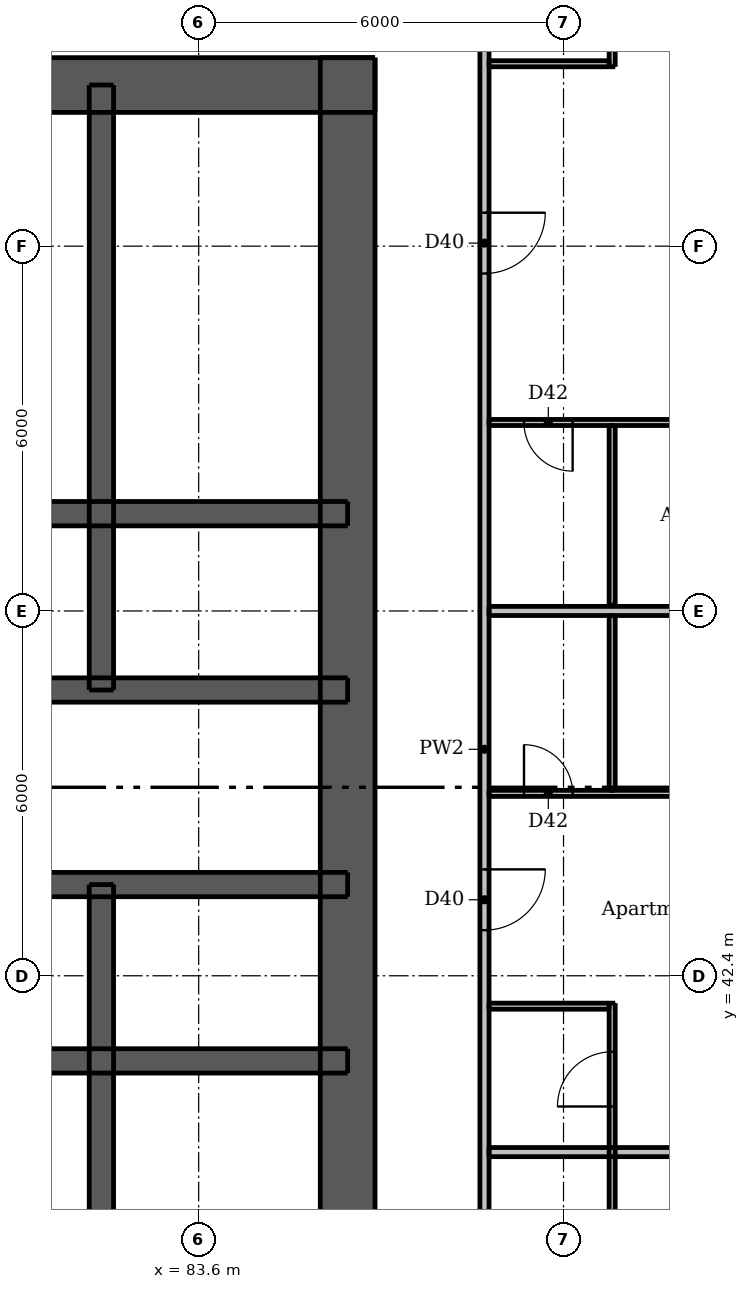
"""IFC4 building model, lengths in metres.
Left out: names, types, materials, properties, quantities, classifications, styles, units other than length and angle.
Written with IfcOpenShell. Run it as: python <this file> out.ifc"""

import sys

from ifc_helpers import new_model, si_unit, direction, frame, frame_2d, origin, place, context, subcontext, project, spatial, rectangle, extrude, element, fill, save


model = new_model("IFC4")
c1 = context("Model", 3, precision=1e-05, world=origin(), true_north=direction((0.0, 1.0)))
c2 = subcontext(c1, "Body", "Model", "MODEL_VIEW")
j1 = project(units=[si_unit("LENGTHUNIT", "METRE"), si_unit("PLANEANGLEUNIT", "RADIAN")], contexts=[c1])
p1 = place(None, origin())
s1 = spatial("IfcSite", under=j1, at=p1, CompositionType="ELEMENT")
p2 = place(p1, origin())
s2 = spatial("IfcBuilding", under=s1, at=p2, CompositionType="ELEMENT")
p3 = place(p2, frame((0.0, 0.0, 26.8)))
s3 = spatial("IfcBuildingStorey", under=s2, at=p3, CompositionType="ELEMENT", Elevation=26.8)
p4 = place(p3, frame((62.5, 57.05, 0.0), z_axis=(0.0, 0.0, 1.0), x_axis=(1.0, 0.0, 0.0)))
e1 = element("IfcWall", 1, at=p4, inside=s3, PredefinedType="SHEAR", context=c2, shape_type="SweptSolid", body=[
    extrude(rectangle(XDim=24.0, YDim=0.9, at=frame_2d((12.0, 0.0))), origin(), (0.0, 0.0, 1.0), 3.05),
])
p5 = place(p4, frame((20.85, 0.0, 0.0)))
e2 = element("IfcOpeningElement", 2, at=p5, cuts=e1, PredefinedType="OPENING", context=c2, shape_type="SweptSolid", body=[
    extrude(rectangle(XDim=1.1, YDim=2.1, at=frame_2d((0.55, 1.05))), frame((0.0, 0.46, 0.0), z_axis=(0.0, -1.0, 0.0), x_axis=(1.0, 0.0, 0.0)), (0.0, 0.0, 1.0), 0.92),
])
p6 = place(p4, frame((2.05, 0.0, 0.0)))
e3 = element("IfcOpeningElement", 3, at=p6, cuts=e1, PredefinedType="OPENING", context=c2, shape_type="SweptSolid", body=[
    extrude(rectangle(XDim=1.1, YDim=2.1, at=frame_2d((0.55, 1.05))), frame((0.0, 0.46, 0.0), z_axis=(0.0, -1.0, 0.0), x_axis=(1.0, 0.0, 0.0)), (0.0, 0.0, 1.0), 0.92),
])
p7 = place(p4, frame((6.44, 0.0, 0.0)))
e4 = element("IfcOpeningElement", 4, at=p7, cuts=e1, PredefinedType="OPENING", context=c2, shape_type="SweptSolid", body=[
    extrude(rectangle(XDim=0.9, YDim=2.1, at=frame_2d((0.45, 1.05))), frame((0.0, 0.46, 0.0), z_axis=(0.0, -1.0, 0.0), x_axis=(1.0, 0.0, 0.0)), (0.0, 0.0, 1.0), 0.92),
])
p8 = place(p4, frame((13.74, 0.0, 0.0)))
e5 = element("IfcOpeningElement", 5, at=p8, cuts=e1, PredefinedType="OPENING", context=c2, shape_type="SweptSolid", body=[
    extrude(rectangle(XDim=0.9, YDim=2.1, at=frame_2d((0.45, 1.05))), frame((0.0, 0.46, 0.0), z_axis=(0.0, -1.0, 0.0), x_axis=(1.0, 0.0, 0.0)), (0.0, 0.0, 1.0), 0.92),
])
p9 = place(p3, frame((86.05, 33.5, 0.0), z_axis=(0.0, 0.0, 1.0), x_axis=(0.0, 1.0, 0.0)))
e6 = element("IfcWall", 6, at=p9, inside=s3, PredefinedType="SHEAR", context=c2, shape_type="SweptSolid", body=[
    extrude(rectangle(XDim=24.0, YDim=0.9, at=frame_2d((12.0, 0.0))), origin(), (0.0, 0.0, 1.0), 3.05),
])
p10 = place(p9, frame((11.2, 0.0, 0.0)))
e7 = element("IfcOpeningElement", 7, at=p10, cuts=e6, PredefinedType="OPENING", context=c2, shape_type="SweptSolid", body=[
    extrude(rectangle(XDim=1.6, YDim=2.1, at=frame_2d((0.8, 1.05))), frame((0.0, 0.46, 0.0), z_axis=(0.0, -1.0, 0.0), x_axis=(1.0, 0.0, 0.0)), (0.0, 0.0, 1.0), 0.92),
])
p11 = place(p3, frame((62.95, 41.0, 0.0), z_axis=(0.0, 0.0, 1.0), x_axis=(1.0, 0.0, 0.0)))
e8 = element("IfcWall", 8, at=p11, inside=s3, PredefinedType="SHEAR", context=c2, shape_type="SweptSolid", body=[
    extrude(rectangle(XDim=23.1, YDim=0.4, at=frame_2d((11.55, 0.0))), origin(), (0.0, 0.0, 1.0), 3.05),
])
p12 = place(p3, frame((62.95, 43.9, 0.0), z_axis=(0.0, 0.0, 1.0), x_axis=(1.0, 0.0, 0.0)))
e9 = element("IfcWall", 9, at=p12, inside=s3, PredefinedType="SHEAR", context=c2, shape_type="SweptSolid", body=[
    extrude(rectangle(XDim=23.1, YDim=0.4, at=frame_2d((11.55, 0.0))), origin(), (0.0, 0.0, 1.0), 3.05),
])
p13 = place(p12, frame((1.7, 0.0, 0.0)))
e10 = element("IfcOpeningElement", 10, at=p13, cuts=e9, PredefinedType="OPENING", context=c2, shape_type="SweptSolid", body=[
    extrude(rectangle(XDim=0.9, YDim=2.1, at=frame_2d((0.45, 1.05))), frame((0.0, 0.21, 0.0), z_axis=(0.0, -1.0, 0.0), x_axis=(1.0, 0.0, 0.0)), (0.0, 0.0, 1.0), 0.42),
])
p14 = place(p12, frame((20.5, 0.0, 0.0)))
e11 = element("IfcOpeningElement", 11, at=p14, cuts=e9, PredefinedType="OPENING", context=c2, shape_type="SweptSolid", body=[
    extrude(rectangle(XDim=0.9, YDim=2.1, at=frame_2d((0.45, 1.05))), frame((0.0, 0.21, 0.0), z_axis=(0.0, -1.0, 0.0), x_axis=(1.0, 0.0, 0.0)), (0.0, 0.0, 1.0), 0.42),
])
p15 = place(p12, frame((4.75, 0.0, 0.0)))
e12 = element("IfcOpeningElement", 12, at=p15, cuts=e9, PredefinedType="OPENING", context=c2, shape_type="SweptSolid", body=[
    extrude(rectangle(XDim=1.1, YDim=2.1, at=frame_2d((0.55, 1.05))), frame((0.0, 0.21, 0.0), z_axis=(0.0, -1.0, 0.0), x_axis=(1.0, 0.0, 0.0)), (0.0, 0.0, 1.0), 0.42),
])
p16 = place(p12, frame((7.25, 0.0, 0.0)))
e13 = element("IfcOpeningElement", 13, at=p16, cuts=e9, PredefinedType="OPENING", context=c2, shape_type="SweptSolid", body=[
    extrude(rectangle(XDim=1.1, YDim=2.1, at=frame_2d((0.55, 1.05))), frame((0.0, 0.21, 0.0), z_axis=(0.0, -1.0, 0.0), x_axis=(1.0, 0.0, 0.0)), (0.0, 0.0, 1.0), 0.42),
])
p17 = place(p12, frame((9.75, 0.0, 0.0)))
e14 = element("IfcOpeningElement", 14, at=p17, cuts=e9, PredefinedType="OPENING", context=c2, shape_type="SweptSolid", body=[
    extrude(rectangle(XDim=1.1, YDim=2.1, at=frame_2d((0.55, 1.05))), frame((0.0, 0.21, 0.0), z_axis=(0.0, -1.0, 0.0), x_axis=(1.0, 0.0, 0.0)), (0.0, 0.0, 1.0), 0.42),
])
p18 = place(p12, frame((12.25, 0.0, 0.0)))
e15 = element("IfcOpeningElement", 15, at=p18, cuts=e9, PredefinedType="OPENING", context=c2, shape_type="SweptSolid", body=[
    extrude(rectangle(XDim=1.1, YDim=2.1, at=frame_2d((0.55, 1.05))), frame((0.0, 0.21, 0.0), z_axis=(0.0, -1.0, 0.0), x_axis=(1.0, 0.0, 0.0)), (0.0, 0.0, 1.0), 0.42),
])
p19 = place(p12, frame((14.75, 0.0, 0.0)))
e16 = element("IfcOpeningElement", 16, at=p19, cuts=e9, PredefinedType="OPENING", context=c2, shape_type="SweptSolid", body=[
    extrude(rectangle(XDim=1.1, YDim=2.1, at=frame_2d((0.55, 1.05))), frame((0.0, 0.21, 0.0), z_axis=(0.0, -1.0, 0.0), x_axis=(1.0, 0.0, 0.0)), (0.0, 0.0, 1.0), 0.42),
])
p20 = place(p12, frame((17.25, 0.0, 0.0)))
e17 = element("IfcOpeningElement", 17, at=p20, cuts=e9, PredefinedType="OPENING", context=c2, shape_type="SweptSolid", body=[
    extrude(rectangle(XDim=1.1, YDim=2.1, at=frame_2d((0.55, 1.05))), frame((0.0, 0.21, 0.0), z_axis=(0.0, -1.0, 0.0), x_axis=(1.0, 0.0, 0.0)), (0.0, 0.0, 1.0), 0.42),
])
p21 = place(p3, frame((62.95, 47.1, 0.0), z_axis=(0.0, 0.0, 1.0), x_axis=(1.0, 0.0, 0.0)))
e18 = element("IfcWall", 18, at=p21, inside=s3, PredefinedType="SHEAR", context=c2, shape_type="SweptSolid", body=[
    extrude(rectangle(XDim=23.1, YDim=0.4, at=frame_2d((11.55, 0.0))), origin(), (0.0, 0.0, 1.0), 3.05),
])
p22 = place(p21, frame((0.85, 0.0, 0.0)))
e19 = element("IfcOpeningElement", 19, at=p22, cuts=e18, PredefinedType="OPENING", context=c2, shape_type="SweptSolid", body=[
    extrude(rectangle(XDim=0.9, YDim=2.1, at=frame_2d((0.45, 1.05))), frame((0.0, 0.21, 0.0), z_axis=(0.0, -1.0, 0.0), x_axis=(1.0, 0.0, 0.0)), (0.0, 0.0, 1.0), 0.42),
])
p23 = place(p21, frame((2.55, 0.0, 0.0)))
e20 = element("IfcOpeningElement", 20, at=p23, cuts=e18, PredefinedType="OPENING", context=c2, shape_type="SweptSolid", body=[
    extrude(rectangle(XDim=0.9, YDim=2.1, at=frame_2d((0.45, 1.05))), frame((0.0, 0.21, 0.0), z_axis=(0.0, -1.0, 0.0), x_axis=(1.0, 0.0, 0.0)), (0.0, 0.0, 1.0), 0.42),
])
p24 = place(p21, frame((20.5, 0.0, 0.0)))
e21 = element("IfcOpeningElement", 21, at=p24, cuts=e18, PredefinedType="OPENING", context=c2, shape_type="SweptSolid", body=[
    extrude(rectangle(XDim=0.9, YDim=2.1, at=frame_2d((0.45, 1.05))), frame((0.0, 0.21, 0.0), z_axis=(0.0, -1.0, 0.0), x_axis=(1.0, 0.0, 0.0)), (0.0, 0.0, 1.0), 0.42),
])
p25 = place(p3, frame((62.95, 50.0, 0.0), z_axis=(0.0, 0.0, 1.0), x_axis=(1.0, 0.0, 0.0)))
e22 = element("IfcWall", 22, at=p25, inside=s3, PredefinedType="SHEAR", context=c2, shape_type="SweptSolid", body=[
    extrude(rectangle(XDim=23.1, YDim=0.4, at=frame_2d((11.55, 0.0))), origin(), (0.0, 0.0, 1.0), 3.05),
])
for number, where, z_axis, x_axis in (
    (23, (82.0, 33.95, 0.0), (0.0, 0.0, 1.0), (0.0, 1.0, 0.0)),
    (24, (82.0, 47.1, 0.0), (0.0, 0.0, 1.0), (0.0, 1.0, 0.0)),
):
    element("IfcWall", number, at=place(p3, frame(where, z_axis=z_axis, x_axis=x_axis)), inside=s3, PredefinedType="SHEAR", context=c2, shape_type="SweptSolid", body=[
        extrude(rectangle(XDim=9.95, YDim=0.4, at=frame_2d((4.975, 0.0))), origin(), (0.0, 0.0, 1.0), 3.05),
    ])
p26 = place(p3, frame((90.4, 33.45, 0.0), z_axis=(0.0, 0.0, 1.0), x_axis=(0.0, 1.0, 0.0)))
e25 = element("IfcWall", 25, at=p26, inside=s3, PredefinedType="PARTITIONING", context=c2, shape_type="SweptSolid", body=[
    extrude(rectangle(XDim=8.5, YDim=0.1, at=frame_2d((4.25, 0.0))), origin(), (0.0, 0.0, 1.0), 3.05),
])
p27 = place(p26, frame((3.8, 0.0, 0.0)))
e26 = element("IfcOpeningElement", 26, at=p27, cuts=e25, PredefinedType="OPENING", context=c2, shape_type="SweptSolid", body=[
    extrude(rectangle(XDim=0.8, YDim=2.1, at=frame_2d((0.4, 1.05))), frame((0.0, 0.06, 0.0), z_axis=(0.0, -1.0, 0.0), x_axis=(1.0, 0.0, 0.0)), (0.0, 0.0, 1.0), 0.12),
])
p28 = place(p26, frame((6.8, 0.0, 0.0)))
e27 = element("IfcOpeningElement", 27, at=p28, cuts=e25, PredefinedType="OPENING", context=c2, shape_type="SweptSolid", body=[
    extrude(rectangle(XDim=0.9, YDim=2.1, at=frame_2d((0.45, 1.05))), frame((0.0, 0.06, 0.0), z_axis=(0.0, -1.0, 0.0), x_axis=(1.0, 0.0, 0.0)), (0.0, 0.0, 1.0), 0.12),
])
p29 = place(p3, frame((90.4, 45.45, 0.0), z_axis=(0.0, 0.0, 1.0), x_axis=(0.0, 1.0, 0.0)))
e28 = element("IfcWall", 28, at=p29, inside=s3, PredefinedType="PARTITIONING", context=c2, shape_type="SweptSolid", body=[
    extrude(rectangle(XDim=2.875, YDim=0.1, at=frame_2d((1.438, 0.0))), origin(), (0.0, 0.0, 1.0), 3.05),
])
p30 = place(p3, frame((90.4, 48.5, 0.0), z_axis=(0.0, 0.0, 1.0), x_axis=(0.0, 1.0, 0.0)))
e29 = element("IfcWall", 29, at=p30, inside=s3, PredefinedType="PARTITIONING", context=c2, shape_type="SweptSolid", body=[
    extrude(rectangle(XDim=2.95, YDim=0.1, at=frame_2d((1.475, 0.0))), origin(), (0.0, 0.0, 1.0), 3.05),
])
p31 = place(p3, frame((90.4, 57.35, 0.0), z_axis=(0.0, 0.0, 1.0), x_axis=(0.0, 1.0, 0.0)))
e30 = element("IfcWall", 30, at=p31, inside=s3, PredefinedType="PARTITIONING", context=c2, shape_type="SweptSolid", body=[
    extrude(rectangle(XDim=2.975, YDim=0.1, at=frame_2d((1.487, 0.0))), origin(), (0.0, 0.0, 1.0), 3.05),
])
p32 = place(p31, frame((1.1, 0.0, 0.0)))
e31 = element("IfcOpeningElement", 31, at=p32, cuts=e30, PredefinedType="OPENING", context=c2, shape_type="SweptSolid", body=[
    extrude(rectangle(XDim=0.9, YDim=2.1, at=frame_2d((0.45, 1.05))), frame((0.0, 0.06, 0.0), z_axis=(0.0, -1.0, 0.0), x_axis=(1.0, 0.0, 0.0)), (0.0, 0.0, 1.0), 0.12),
])
p33 = place(p3, frame((88.375, 57.4, 0.0), z_axis=(0.0, 0.0, 1.0), x_axis=(1.0, 0.0, 0.0)))
e32 = element("IfcWall", 32, at=p33, inside=s3, PredefinedType="PARTITIONING", context=c2, shape_type="SweptSolid", body=[
    extrude(rectangle(XDim=1.975, YDim=0.1, at=frame_2d((0.988, 0.0))), origin(), (0.0, 0.0, 1.0), 3.05),
])
p34 = place(p3, frame((98.5, 51.5, 0.0), z_axis=(0.0, 0.0, 1.0), x_axis=(-1.0, 0.0, 0.0)))
e33 = element("IfcWall", 33, at=p34, inside=s3, PredefinedType="PARTITIONING", context=c2, shape_type="SweptSolid", body=[
    extrude(rectangle(XDim=10.125, YDim=0.1, at=frame_2d((5.062, 0.0))), origin(), (0.0, 0.0, 1.0), 3.05),
])
p35 = place(p34, frame((3.6, 0.0, 0.0)))
e34 = element("IfcOpeningElement", 34, at=p35, cuts=e33, PredefinedType="OPENING", context=c2, shape_type="SweptSolid", body=[
    extrude(rectangle(XDim=0.9, YDim=2.1, at=frame_2d((0.45, 1.05))), frame((0.0, 0.06, 0.0), z_axis=(0.0, -1.0, 0.0), x_axis=(1.0, 0.0, 0.0)), (0.0, 0.0, 1.0), 0.12),
])
p36 = place(p34, frame((8.75, 0.0, 0.0)))
e35 = element("IfcOpeningElement", 35, at=p36, cuts=e33, PredefinedType="OPENING", context=c2, shape_type="SweptSolid", body=[
    extrude(rectangle(XDim=0.8, YDim=2.1, at=frame_2d((0.4, 1.05))), frame((0.0, 0.06, 0.0), z_axis=(0.0, -1.0, 0.0), x_axis=(1.0, 0.0, 0.0)), (0.0, 0.0, 1.0), 0.12),
])
p37 = place(p3, frame((88.375, 45.4, 0.0), z_axis=(0.0, 0.0, 1.0), x_axis=(1.0, 0.0, 0.0)))
e36 = element("IfcWall", 36, at=p37, inside=s3, PredefinedType="PARTITIONING", context=c2, shape_type="SweptSolid", body=[
    extrude(rectangle(XDim=10.125, YDim=0.1, at=frame_2d((5.062, 0.0))), origin(), (0.0, 0.0, 1.0), 3.05),
])
p38 = place(p37, frame((5.625, 0.0, 0.0)))
e37 = element("IfcOpeningElement", 37, at=p38, cuts=e36, PredefinedType="OPENING", context=c2, shape_type="SweptSolid", body=[
    extrude(rectangle(XDim=0.9, YDim=2.1, at=frame_2d((0.45, 1.05))), frame((0.0, 0.06, 0.0), z_axis=(0.0, -1.0, 0.0), x_axis=(1.0, 0.0, 0.0)), (0.0, 0.0, 1.0), 0.12),
])
p39 = place(p37, frame((0.575, 0.0, 0.0)))
e38 = element("IfcOpeningElement", 38, at=p39, cuts=e36, PredefinedType="OPENING", context=c2, shape_type="SweptSolid", body=[
    extrude(rectangle(XDim=0.8, YDim=2.1, at=frame_2d((0.4, 1.05))), frame((0.0, 0.06, 0.0), z_axis=(0.0, -1.0, 0.0), x_axis=(1.0, 0.0, 0.0)), (0.0, 0.0, 1.0), 0.12),
])
p40 = place(p3, frame((88.375, 41.9, 0.0), z_axis=(0.0, 0.0, 1.0), x_axis=(1.0, 0.0, 0.0)))
e39 = element("IfcWall", 39, at=p40, inside=s3, PredefinedType="PARTITIONING", context=c2, shape_type="SweptSolid", body=[
    extrude(rectangle(XDim=1.975, YDim=0.1, at=frame_2d((0.988, 0.0))), origin(), (0.0, 0.0, 1.0), 3.05),
])
p41 = place(p3, frame((88.3, 60.475, 0.0), z_axis=(0.0, 0.0, 1.0), x_axis=(0.0, -1.0, 0.0)))
e40 = element("IfcWall", 40, at=p41, inside=s3, PredefinedType="PARTITIONING", context=c2, shape_type="SweptSolid", body=[
    extrude(rectangle(XDim=28.7, YDim=0.15, at=frame_2d((14.35, 0.0))), origin(), (0.0, 0.0, 1.0), 3.05),
])
p42 = place(p41, frame((27.425, 0.0, 0.0)))
e41 = element("IfcOpeningElement", 41, at=p42, cuts=e40, PredefinedType="OPENING", context=c2, shape_type="SweptSolid", body=[
    extrude(rectangle(XDim=1.0, YDim=2.1, at=frame_2d((0.5, 1.05))), frame((0.0, 0.085, 0.0), z_axis=(0.0, -1.0, 0.0), x_axis=(1.0, 0.0, 0.0)), (0.0, 0.0, 1.0), 0.17),
])
p43 = place(p41, frame((16.325, 0.0, 0.0)))
e42 = element("IfcOpeningElement", 42, at=p43, cuts=e40, PredefinedType="OPENING", context=c2, shape_type="SweptSolid", body=[
    extrude(rectangle(XDim=1.0, YDim=2.1, at=frame_2d((0.5, 1.05))), frame((0.0, 0.085, 0.0), z_axis=(0.0, -1.0, 0.0), x_axis=(1.0, 0.0, 0.0)), (0.0, 0.0, 1.0), 0.17),
])
p44 = place(p41, frame((5.525, 0.0, 0.0)))
e43 = element("IfcOpeningElement", 43, at=p44, cuts=e40, PredefinedType="OPENING", context=c2, shape_type="SweptSolid", body=[
    extrude(rectangle(XDim=1.0, YDim=2.1, at=frame_2d((0.5, 1.05))), frame((0.0, 0.085, 0.0), z_axis=(0.0, -1.0, 0.0), x_axis=(1.0, 0.0, 0.0)), (0.0, 0.0, 1.0), 0.17),
])
p45 = place(p3, frame((88.375, 48.4, 0.0), z_axis=(0.0, 0.0, 1.0), x_axis=(1.0, 0.0, 0.0)))
e44 = element("IfcWall", 44, at=p45, inside=s3, PredefinedType="PARTITIONING", context=c2, shape_type="SweptSolid", body=[
    extrude(rectangle(XDim=10.125, YDim=0.15, at=frame_2d((5.062, 0.0))), origin(), (0.0, 0.0, 1.0), 2.516),
])
p46 = place(p3, frame((88.375, 39.5, 0.0), z_axis=(0.0, 0.0, 1.0), x_axis=(1.0, 0.0, 0.0)))
e45 = element("IfcWall", 45, at=p46, inside=s3, PredefinedType="PARTITIONING", context=c2, shape_type="SweptSolid", body=[
    extrude(rectangle(XDim=5.625, YDim=0.15, at=frame_2d((2.812, 0.0))), origin(), (0.0, 0.0, 1.0), 3.05),
])
p47 = place(p5, origin())
e46 = element("IfcDoor", 46, at=p47, inside=s3, OperationType="SINGLE_SWING_RIGHT", PredefinedType="DOOR", context=c2, shape_type="SweptSolid", body=[
    extrude(rectangle(XDim=1.1, YDim=2.1, at=frame_2d((0.55, 1.05))), frame((0.0, -0.388, 0.0), z_axis=(0.0, -1.0, 0.0), x_axis=(1.0, 0.0, 0.0)), (0.0, 0.0, 1.0), 0.05),
])
fill(e2, e46)
p48 = place(p10, origin())
e47 = element("IfcDoor", 47, at=p48, inside=s3, OperationType="DOUBLE_DOOR_SINGLE_SWING", PredefinedType="DOOR", context=c2, shape_type="SweptSolid", body=[
    extrude(rectangle(XDim=1.6, YDim=2.1, at=frame_2d((0.8, 1.05))), frame((0.0, 0.438, 0.0), z_axis=(0.0, -1.0, 0.0), x_axis=(1.0, 0.0, 0.0)), (0.0, 0.0, 1.0), 0.05),
])
fill(e7, e47)
p49 = place(p14, origin())
e48 = element("IfcDoor", 48, at=p49, inside=s3, OperationType="SINGLE_SWING_LEFT", PredefinedType="DOOR", context=c2, shape_type="SweptSolid", body=[
    extrude(rectangle(XDim=0.9, YDim=2.1, at=frame_2d((0.45, 1.05))), frame((0.0, -0.138, 0.0), z_axis=(0.0, -1.0, 0.0), x_axis=(1.0, 0.0, 0.0)), (0.0, 0.0, 1.0), 0.05),
])
fill(e11, e48)
p50 = place(p24, origin())
e49 = element("IfcDoor", 49, at=p50, inside=s3, OperationType="SINGLE_SWING_LEFT", PredefinedType="DOOR", context=c2, shape_type="SweptSolid", body=[
    extrude(rectangle(XDim=0.9, YDim=2.1, at=frame_2d((0.45, 1.05))), frame((0.0, 0.188, 0.0), z_axis=(0.0, -1.0, 0.0), x_axis=(1.0, 0.0, 0.0)), (0.0, 0.0, 1.0), 0.05),
])
fill(e21, e49)
p51 = place(p20, origin())
e50 = element("IfcDoor", 50, at=p51, inside=s3, OperationType="DOUBLE_DOOR_SLIDING", PredefinedType="DOOR", context=c2, shape_type="SweptSolid", body=[
    extrude(rectangle(XDim=1.1, YDim=2.1, at=frame_2d((0.55, 1.05))), frame((0.0, 0.025, 0.0), z_axis=(0.0, -1.0, 0.0), x_axis=(1.0, 0.0, 0.0)), (0.0, 0.0, 1.0), 0.05),
])
fill(e17, e50)
p52 = place(p43, origin())
e51 = element("IfcDoor", 51, at=p52, inside=s3, OperationType="SINGLE_SWING_LEFT", PredefinedType="DOOR", context=c2, shape_type="SweptSolid", body=[
    extrude(rectangle(XDim=1.0, YDim=2.1, at=frame_2d((0.5, 1.05))), frame((0.0, 0.025, 0.0), z_axis=(0.0, -1.0, 0.0), x_axis=(1.0, 0.0, 0.0)), (0.0, 0.0, 1.0), 0.05),
])
fill(e42, e51)
p53 = place(p28, origin())
e52 = element("IfcDoor", 52, at=p53, inside=s3, OperationType="SINGLE_SWING_LEFT", PredefinedType="DOOR", context=c2, shape_type="SweptSolid", body=[
    extrude(rectangle(XDim=0.9, YDim=2.1, at=frame_2d((0.45, 1.05))), frame((0.0, 0.025, 0.0), z_axis=(0.0, -1.0, 0.0), x_axis=(1.0, 0.0, 0.0)), (0.0, 0.0, 1.0), 0.05),
])
fill(e27, e52)
p54 = place(p39, origin())
e53 = element("IfcDoor", 53, at=p54, inside=s3, OperationType="SINGLE_SWING_LEFT", PredefinedType="DOOR", context=c2, shape_type="SweptSolid", body=[
    extrude(rectangle(XDim=0.8, YDim=2.1, at=frame_2d((0.4, 1.05))), frame((0.0, 0.025, 0.0), z_axis=(0.0, -1.0, 0.0), x_axis=(1.0, 0.0, 0.0)), (0.0, 0.0, 1.0), 0.05),
])
fill(e38, e53)
p55 = place(p44, origin())
e54 = element("IfcDoor", 54, at=p55, inside=s3, OperationType="SINGLE_SWING_LEFT", PredefinedType="DOOR", context=c2, shape_type="SweptSolid", body=[
    extrude(rectangle(XDim=1.0, YDim=2.1, at=frame_2d((0.5, 1.05))), frame((0.0, 0.025, 0.0), z_axis=(0.0, -1.0, 0.0), x_axis=(1.0, 0.0, 0.0)), (0.0, 0.0, 1.0), 0.05),
])
fill(e43, e54)
p56 = place(p36, origin())
e55 = element("IfcDoor", 55, at=p56, inside=s3, OperationType="SINGLE_SWING_LEFT", PredefinedType="DOOR", context=c2, shape_type="SweptSolid", body=[
    extrude(rectangle(XDim=0.8, YDim=2.1, at=frame_2d((0.4, 1.05))), frame((0.0, 0.025, 0.0), z_axis=(0.0, -1.0, 0.0), x_axis=(1.0, 0.0, 0.0)), (0.0, 0.0, 1.0), 0.05),
])
fill(e35, e55)
save(model, sys.argv[1])
